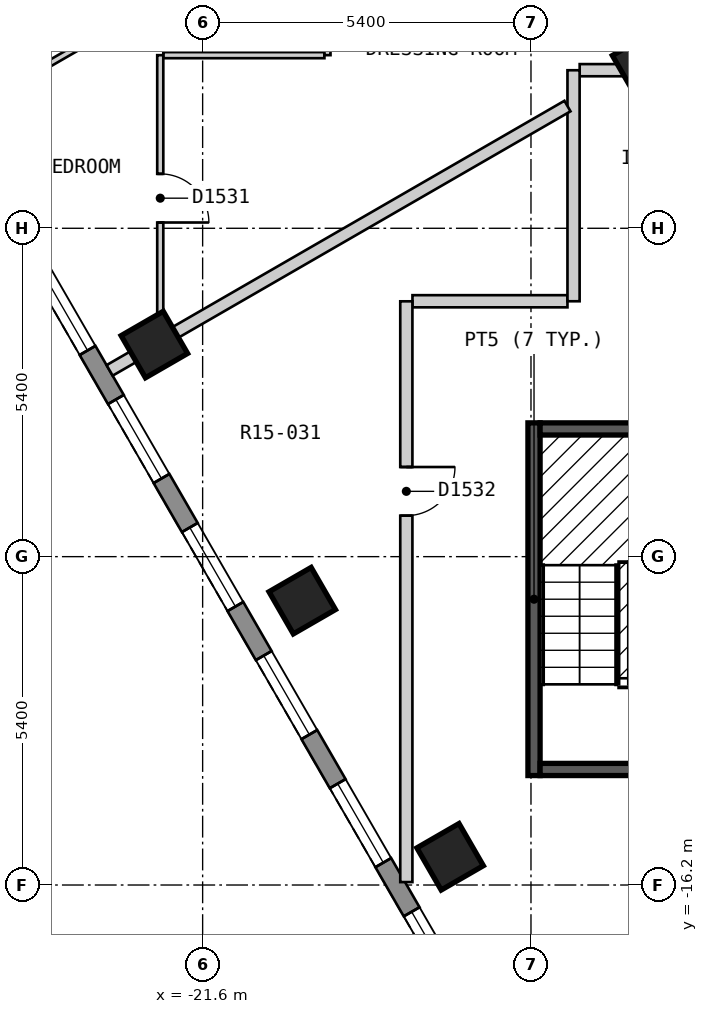
"""IFC4 building model, lengths in metres.
Left out: names, types, materials, properties, quantities, classifications, styles, units other than length and angle.
Written with IfcOpenShell. Run it as: python <this file> out.ifc"""

import sys

from ifc_helpers import new_model, si_unit, direction, frame, frame_2d, origin, origin_2d, place, context, subcontext, project, spatial, polyline, rectangle, outline, extrude, element, fill, save


model = new_model("IFC4")
c1 = context("Model", 3, precision=1e-05, world=origin(), true_north=direction((0.0, 1.0)))
c2 = subcontext(c1, "Body", "Model", "MODEL_VIEW")
j1 = project(units=[si_unit("LENGTHUNIT", "METRE"), si_unit("PLANEANGLEUNIT", "RADIAN")], contexts=[c1])
p1 = place(None, origin())
s1 = spatial("IfcSite", under=j1, at=p1, CompositionType="ELEMENT")
p2 = place(p1, origin())
s2 = spatial("IfcBuilding", under=s1, at=p2, CompositionType="ELEMENT")
p3 = place(p2, frame((0.0, 0.0, 190.2)))
s3 = spatial("IfcBuildingStorey", under=s2, at=p3, CompositionType="ELEMENT", Elevation=190.2)
for number, where, z_axis, x_axis in (
    (1, (-22.394, -7.312, 0.0), (0.0, 0.0, 1.0), (0.5, -0.866, 0.0)),
    (2, (-19.962, -11.524, 0.0), (0.0, 0.0, 1.0), (0.5, -0.866, 0.0)),
    (3, (-17.53, -15.736, 0.0), (0.0, 0.0, 1.0), (0.5, -0.866, 0.0)),
):
    element("IfcColumn", number, at=place(p3, frame(where, z_axis=z_axis, x_axis=x_axis)), inside=s3, PredefinedType="COLUMN", context=c2, shape_type="SweptSolid", body=[
        extrude(rectangle(XDim=0.8, YDim=0.8, at=origin_2d()), origin(), (0.0, 0.0, 1.0), 3.0),
    ])
p4 = place(p3, frame((-14.383, -2.687, 0.0), z_axis=(0.0, 0.0, 1.0), x_axis=(0.5, -0.866025403784, 0.0)))
e4 = element("IfcColumn", 4, at=p4, inside=s3, PredefinedType="COLUMN", context=c2, shape_type="SweptSolid", body=[
    extrude(rectangle(XDim=0.7, YDim=0.7, at=origin_2d()), origin(), (0.0, 0.0, 1.0), 3.0),
])
p5 = place(p3, frame((-26.024, -3.025, 0.0), z_axis=(0.0, 0.0, 1.0), x_axis=(0.500018670445, -0.86601462413, 0.0)))
e5 = element("IfcWall", 5, at=p5, inside=s3, PredefinedType="SOLIDWALL", context=c2, shape_type="SweptSolid", body=[
    extrude(outline(polyline([(0.0, -0.15), (20.785, -0.15), (20.705, 0.15), (0.08, 0.15), (0.0, -0.15)])), origin(), (0.0, 0.0, 1.0), 2.7),
])
p6 = place(p5, frame((1.13, 0.0, 0.15)))
e6 = element("IfcOpeningElement", 6, at=p6, cuts=e5, PredefinedType="OPENING", context=c2, shape_type="SweptSolid", body=[
    extrude(rectangle(XDim=1.5, YDim=2.1, at=frame_2d((0.75, 1.05))), frame((0.0, 0.16, 0.0), z_axis=(0.0, -1.0, 0.0), x_axis=(1.0, 0.0, 0.0)), (0.0, 0.0, 1.0), 0.32),
])
p7 = place(p5, frame((3.562, 0.0, 0.15)))
e7 = element("IfcOpeningElement", 7, at=p7, cuts=e5, PredefinedType="OPENING", context=c2, shape_type="SweptSolid", body=[
    extrude(rectangle(XDim=1.5, YDim=2.1, at=frame_2d((0.75, 1.05))), frame((0.0, 0.16, 0.0), z_axis=(0.0, -1.0, 0.0), x_axis=(1.0, 0.0, 0.0)), (0.0, 0.0, 1.0), 0.32),
])
p8 = place(p5, frame((5.994, 0.0, 0.15)))
e8 = element("IfcOpeningElement", 8, at=p8, cuts=e5, PredefinedType="OPENING", context=c2, shape_type="SweptSolid", body=[
    extrude(rectangle(XDim=1.5, YDim=2.1, at=frame_2d((0.75, 1.05))), frame((0.0, 0.16, 0.0), z_axis=(0.0, -1.0, 0.0), x_axis=(1.0, 0.0, 0.0)), (0.0, 0.0, 1.0), 0.32),
])
p9 = place(p5, frame((8.425, 0.0, 0.15)))
e9 = element("IfcOpeningElement", 9, at=p9, cuts=e5, PredefinedType="OPENING", context=c2, shape_type="SweptSolid", body=[
    extrude(rectangle(XDim=1.5, YDim=2.1, at=frame_2d((0.75, 1.05))), frame((0.0, 0.16, 0.0), z_axis=(0.0, -1.0, 0.0), x_axis=(1.0, 0.0, 0.0)), (0.0, 0.0, 1.0), 0.32),
])
p10 = place(p5, frame((10.857, 0.0, 0.15)))
e10 = element("IfcOpeningElement", 10, at=p10, cuts=e5, PredefinedType="OPENING", context=c2, shape_type="SweptSolid", body=[
    extrude(rectangle(XDim=1.5, YDim=2.1, at=frame_2d((0.75, 1.05))), frame((0.0, 0.16, 0.0), z_axis=(0.0, -1.0, 0.0), x_axis=(1.0, 0.0, 0.0)), (0.0, 0.0, 1.0), 0.32),
])
p11 = place(p5, frame((13.289, 0.0, 0.15)))
e11 = element("IfcOpeningElement", 11, at=p11, cuts=e5, PredefinedType="OPENING", context=c2, shape_type="SweptSolid", body=[
    extrude(rectangle(XDim=1.5, YDim=2.1, at=frame_2d((0.75, 1.05))), frame((0.0, 0.16, 0.0), z_axis=(0.0, -1.0, 0.0), x_axis=(1.0, 0.0, 0.0)), (0.0, 0.0, 1.0), 0.32),
])
p12 = place(p5, frame((15.722, 0.0, 0.15)))
e12 = element("IfcOpeningElement", 12, at=p12, cuts=e5, PredefinedType="OPENING", context=c2, shape_type="SweptSolid", body=[
    extrude(rectangle(XDim=1.5, YDim=2.1, at=frame_2d((0.75, 1.05))), frame((0.0, 0.16, 0.0), z_axis=(0.0, -1.0, 0.0), x_axis=(1.0, 0.0, 0.0)), (0.0, 0.0, 1.0), 0.32),
])
p13 = place(p5, frame((18.154, 0.0, 0.15)))
e13 = element("IfcOpeningElement", 13, at=p13, cuts=e5, PredefinedType="OPENING", context=c2, shape_type="SweptSolid", body=[
    extrude(rectangle(XDim=1.5, YDim=2.1, at=frame_2d((0.75, 1.05))), frame((0.0, 0.16, 0.0), z_axis=(0.0, -1.0, 0.0), x_axis=(1.0, 0.0, 0.0)), (0.0, 0.0, 1.0), 0.32),
])
p14 = place(p3, frame((-15.53, -0.701, 0.0), z_axis=(0.0, 0.0, 1.0), x_axis=(0.499972710878, -0.866041158593, 0.0)))
e14 = element("IfcWall", 14, at=p14, inside=s3, PredefinedType="PARTITIONING", context=c2, shape_type="SweptSolid", body=[
    extrude(rectangle(XDim=2.308, YDim=0.2, at=frame_2d((1.154, 0.0))), origin(), (0.0, 0.0, 1.0), 2.7),
])
p15 = place(p3, frame((-18.149, -6.6, 0.0), z_axis=(0.0, 0.0, 1.0), x_axis=(1.0, 0.0, 0.0)))
e15 = element("IfcWall", 15, at=p15, inside=s3, PredefinedType="PARTITIONING", context=c2, shape_type="SweptSolid", body=[
    extrude(rectangle(XDim=2.549, YDim=0.2, at=frame_2d((1.274, 0.0))), origin(), (0.0, 0.0, 1.0), 2.7),
])
p16 = place(p3, frame((-15.399, -2.8, 0.0), z_axis=(0.0, 0.0, 1.0), x_axis=(1.0, 0.0, 0.0)))
e16 = element("IfcWall", 16, at=p16, inside=s3, PredefinedType="PARTITIONING", context=c2, shape_type="SweptSolid", body=[
    extrude(rectangle(XDim=1.081, YDim=0.2, at=frame_2d((0.541, 0.0))), origin(), (0.0, 0.0, 1.0), 2.7),
])
p17 = place(p3, frame((-15.5, -6.6, 0.0), z_axis=(0.0, 0.0, 1.0), x_axis=(0.0, 1.0, 0.0)))
e17 = element("IfcWall", 17, at=p17, inside=s3, PredefinedType="PARTITIONING", context=c2, shape_type="SweptSolid", body=[
    extrude(rectangle(XDim=3.799, YDim=0.2, at=frame_2d((1.899, 0.0))), origin(), (0.0, 0.0, 1.0), 2.7),
])
p18 = place(p3, frame((-18.25, -16.152, 0.0), z_axis=(0.0, 0.0, 1.0), x_axis=(0.0, 1.0, 0.0)))
e18 = element("IfcWall", 18, at=p18, inside=s3, PredefinedType="PARTITIONING", context=c2, shape_type="SweptSolid", body=[
    extrude(rectangle(XDim=9.551, YDim=0.2, at=frame_2d((4.775, 0.0))), origin(), (0.0, 0.0, 1.0), 2.7),
])
p19 = place(p18, frame((6.026, 0.0, 0.0)))
e19 = element("IfcOpeningElement", 19, at=p19, cuts=e18, PredefinedType="OPENING", context=c2, shape_type="SweptSolid", body=[
    extrude(rectangle(XDim=0.8, YDim=2.1, at=frame_2d((0.4, 1.05))), frame((0.0, 0.11, 0.0), z_axis=(0.0, -1.0, 0.0), x_axis=(1.0, 0.0, 0.0)), (0.0, 0.0, 1.0), 0.22),
])
p20 = place(p3, frame((-22.247, -2.553, 0.0), z_axis=(0.0, 0.0, 1.0), x_axis=(1.0, 0.0, 0.0)))
e20 = element("IfcWall", 20, at=p20, inside=s3, PredefinedType="PARTITIONING", context=c2, shape_type="SweptSolid", body=[
    extrude(rectangle(XDim=2.65, YDim=0.1, at=frame_2d((1.325, 0.0))), origin(), (0.0, 0.0, 1.0), 2.7),
])
p21 = place(p3, frame((-19.547, -2.553, 0.0), z_axis=(0.0, 0.0, 1.0), x_axis=(0.0, 1.0, 0.0)))
e21 = element("IfcWall", 21, at=p21, inside=s3, PredefinedType="PARTITIONING", context=c2, shape_type="SweptSolid", body=[
    extrude(rectangle(XDim=0.715, YDim=0.1, at=frame_2d((0.357, 0.0))), origin(), (0.0, 0.0, 1.0), 2.7),
])
p22 = place(p3, frame((-22.297, -7.141, 0.0), z_axis=(0.0, 0.0, 1.0), x_axis=(0.0, 1.0, 0.0)))
e22 = element("IfcWall", 22, at=p22, inside=s3, PredefinedType="PARTITIONING", context=c2, shape_type="SweptSolid", body=[
    extrude(rectangle(XDim=4.588, YDim=0.1, at=frame_2d((2.294, 0.0))), origin(), (0.0, 0.0, 1.0), 2.7),
])
p23 = place(p22, frame((1.836, 0.0, 0.0)))
e23 = element("IfcOpeningElement", 23, at=p23, cuts=e22, PredefinedType="OPENING", context=c2, shape_type="SweptSolid", body=[
    extrude(rectangle(XDim=0.8, YDim=2.1, at=frame_2d((0.4, 1.05))), frame((0.0, 0.06, 0.0), z_axis=(0.0, -1.0, 0.0), x_axis=(1.0, 0.0, 0.0)), (0.0, 0.0, 1.0), 0.12),
])
p24 = place(p3, frame((-25.563, -3.524, 0.0), z_axis=(0.0, 0.0, 1.0), x_axis=(0.866128586522, 0.499821239653, 0.0)))
e24 = element("IfcWall", 24, at=p24, inside=s3, PredefinedType="PARTITIONING", context=c2, shape_type="SweptSolid", body=[
    extrude(rectangle(XDim=5.848, YDim=0.1, at=frame_2d((2.924, 0.0))), origin(), (0.0, 0.0, 1.0), 2.7),
])
p25 = place(p24, frame((2.474, 0.0, 0.0)))
e25 = element("IfcOpeningElement", 25, at=p25, cuts=e24, PredefinedType="OPENING", context=c2, shape_type="SweptSolid", body=[
    extrude(rectangle(XDim=0.9, YDim=2.1, at=frame_2d((0.45, 1.05))), frame((0.0, 0.06, 0.0), z_axis=(0.0, -1.0, 0.0), x_axis=(1.0, 0.0, 0.0)), (0.0, 0.0, 1.0), 0.12),
])
p26 = place(p3, frame((-23.13, -7.737, 0.0), z_axis=(0.0, 0.0, 1.0), x_axis=(0.866033148899, 0.499986584829, 0.0)))
e26 = element("IfcWall", 26, at=p26, inside=s3, PredefinedType="PARTITIONING", context=c2, shape_type="SweptSolid", body=[
    extrude(rectangle(XDim=8.695, YDim=0.2, at=frame_2d((4.347, 0.0))), origin(), (0.0, 0.0, 1.0), 2.7),
])
p27 = place(p3, frame((-16.15, -14.4, 0.0), z_axis=(0.0, 0.0, 1.0), x_axis=(0.0, 1.0, 0.0)))
e27 = element("IfcWall", 27, at=p27, inside=s3, PredefinedType="SOLIDWALL", context=c2, shape_type="SweptSolid", body=[
    extrude(rectangle(XDim=5.8, YDim=0.2, at=frame_2d((2.9, 0.0))), origin(), (0.0, 0.0, 1.0), 2.7),
])
for number, where, z_axis, x_axis in (
    (28, (-16.05, -14.3, 0.0), (0.0, 0.0, 1.0), (1.0, 0.0, 0.0)),
    (29, (-16.05, -8.7, 0.0), (0.0, 0.0, 1.0), (1.0, 0.0, 0.0)),
):
    element("IfcWall", number, at=place(p3, frame(where, z_axis=z_axis, x_axis=x_axis)), inside=s3, PredefinedType="SOLIDWALL", context=c2, shape_type="SweptSolid", body=[
        extrude(rectangle(XDim=2.75, YDim=0.2, at=frame_2d((1.375, 0.0))), origin(), (0.0, 0.0, 1.0), 2.7),
    ])
p28 = place(p7, origin())
e30 = element("IfcWindow", 30, at=p28, inside=s3, PartitioningType="SINGLE_PANEL", PredefinedType="WINDOW", context=c2, shape_type="SweptSolid", body=[
    extrude(rectangle(XDim=1.5, YDim=2.1, at=frame_2d((0.75, 1.05))), frame((0.0, 0.03, 0.0), z_axis=(0.0, -1.0, 0.0), x_axis=(1.0, 0.0, 0.0)), (0.0, 0.0, 1.0), 0.06),
])
fill(e7, e30)
p29 = place(p8, origin())
e31 = element("IfcWindow", 31, at=p29, inside=s3, PartitioningType="SINGLE_PANEL", PredefinedType="WINDOW", context=c2, shape_type="SweptSolid", body=[
    extrude(rectangle(XDim=1.5, YDim=2.1, at=frame_2d((0.75, 1.05))), frame((0.0, 0.03, 0.0), z_axis=(0.0, -1.0, 0.0), x_axis=(1.0, 0.0, 0.0)), (0.0, 0.0, 1.0), 0.06),
])
fill(e8, e31)
p30 = place(p9, origin())
e32 = element("IfcWindow", 32, at=p30, inside=s3, PartitioningType="SINGLE_PANEL", PredefinedType="WINDOW", context=c2, shape_type="SweptSolid", body=[
    extrude(rectangle(XDim=1.5, YDim=2.1, at=frame_2d((0.75, 1.05))), frame((0.0, 0.03, 0.0), z_axis=(0.0, -1.0, 0.0), x_axis=(1.0, 0.0, 0.0)), (0.0, 0.0, 1.0), 0.06),
])
fill(e9, e32)
p31 = place(p10, origin())
e33 = element("IfcWindow", 33, at=p31, inside=s3, PartitioningType="SINGLE_PANEL", PredefinedType="WINDOW", context=c2, shape_type="SweptSolid", body=[
    extrude(rectangle(XDim=1.5, YDim=2.1, at=frame_2d((0.75, 1.05))), frame((0.0, 0.03, 0.0), z_axis=(0.0, -1.0, 0.0), x_axis=(1.0, 0.0, 0.0)), (0.0, 0.0, 1.0), 0.06),
])
fill(e10, e33)
p32 = place(p11, origin())
e34 = element("IfcWindow", 34, at=p32, inside=s3, PartitioningType="SINGLE_PANEL", PredefinedType="WINDOW", context=c2, shape_type="SweptSolid", body=[
    extrude(rectangle(XDim=1.5, YDim=2.1, at=frame_2d((0.75, 1.05))), frame((0.0, 0.03, 0.0), z_axis=(0.0, -1.0, 0.0), x_axis=(1.0, 0.0, 0.0)), (0.0, 0.0, 1.0), 0.06),
])
fill(e11, e34)
p33 = place(p12, origin())
e35 = element("IfcWindow", 35, at=p33, inside=s3, PartitioningType="SINGLE_PANEL", PredefinedType="WINDOW", context=c2, shape_type="SweptSolid", body=[
    extrude(rectangle(XDim=1.5, YDim=2.1, at=frame_2d((0.75, 1.05))), frame((0.0, 0.03, 0.0), z_axis=(0.0, -1.0, 0.0), x_axis=(1.0, 0.0, 0.0)), (0.0, 0.0, 1.0), 0.06),
])
fill(e12, e35)
p34 = place(p23, origin())
e36 = element("IfcDoor", 36, at=p34, inside=s3, OperationType="SINGLE_SWING_LEFT", PredefinedType="DOOR", context=c2, shape_type="SweptSolid", body=[
    extrude(rectangle(XDim=0.8, YDim=2.1, at=frame_2d((0.4, 1.05))), frame((0.0, 0.025, 0.0), z_axis=(0.0, -1.0, 0.0), x_axis=(1.0, 0.0, 0.0)), (0.0, 0.0, 1.0), 0.05),
])
fill(e23, e36)
p35 = place(p19, origin())
e37 = element("IfcDoor", 37, at=p35, inside=s3, OperationType="SINGLE_SWING_RIGHT", PredefinedType="DOOR", context=c2, shape_type="SweptSolid", body=[
    extrude(rectangle(XDim=0.8, YDim=2.1, at=frame_2d((0.4, 1.05))), frame((0.0, 0.025, 0.0), z_axis=(0.0, -1.0, 0.0), x_axis=(1.0, 0.0, 0.0)), (0.0, 0.0, 1.0), 0.05),
])
fill(e19, e37)
save(model, sys.argv[1])
